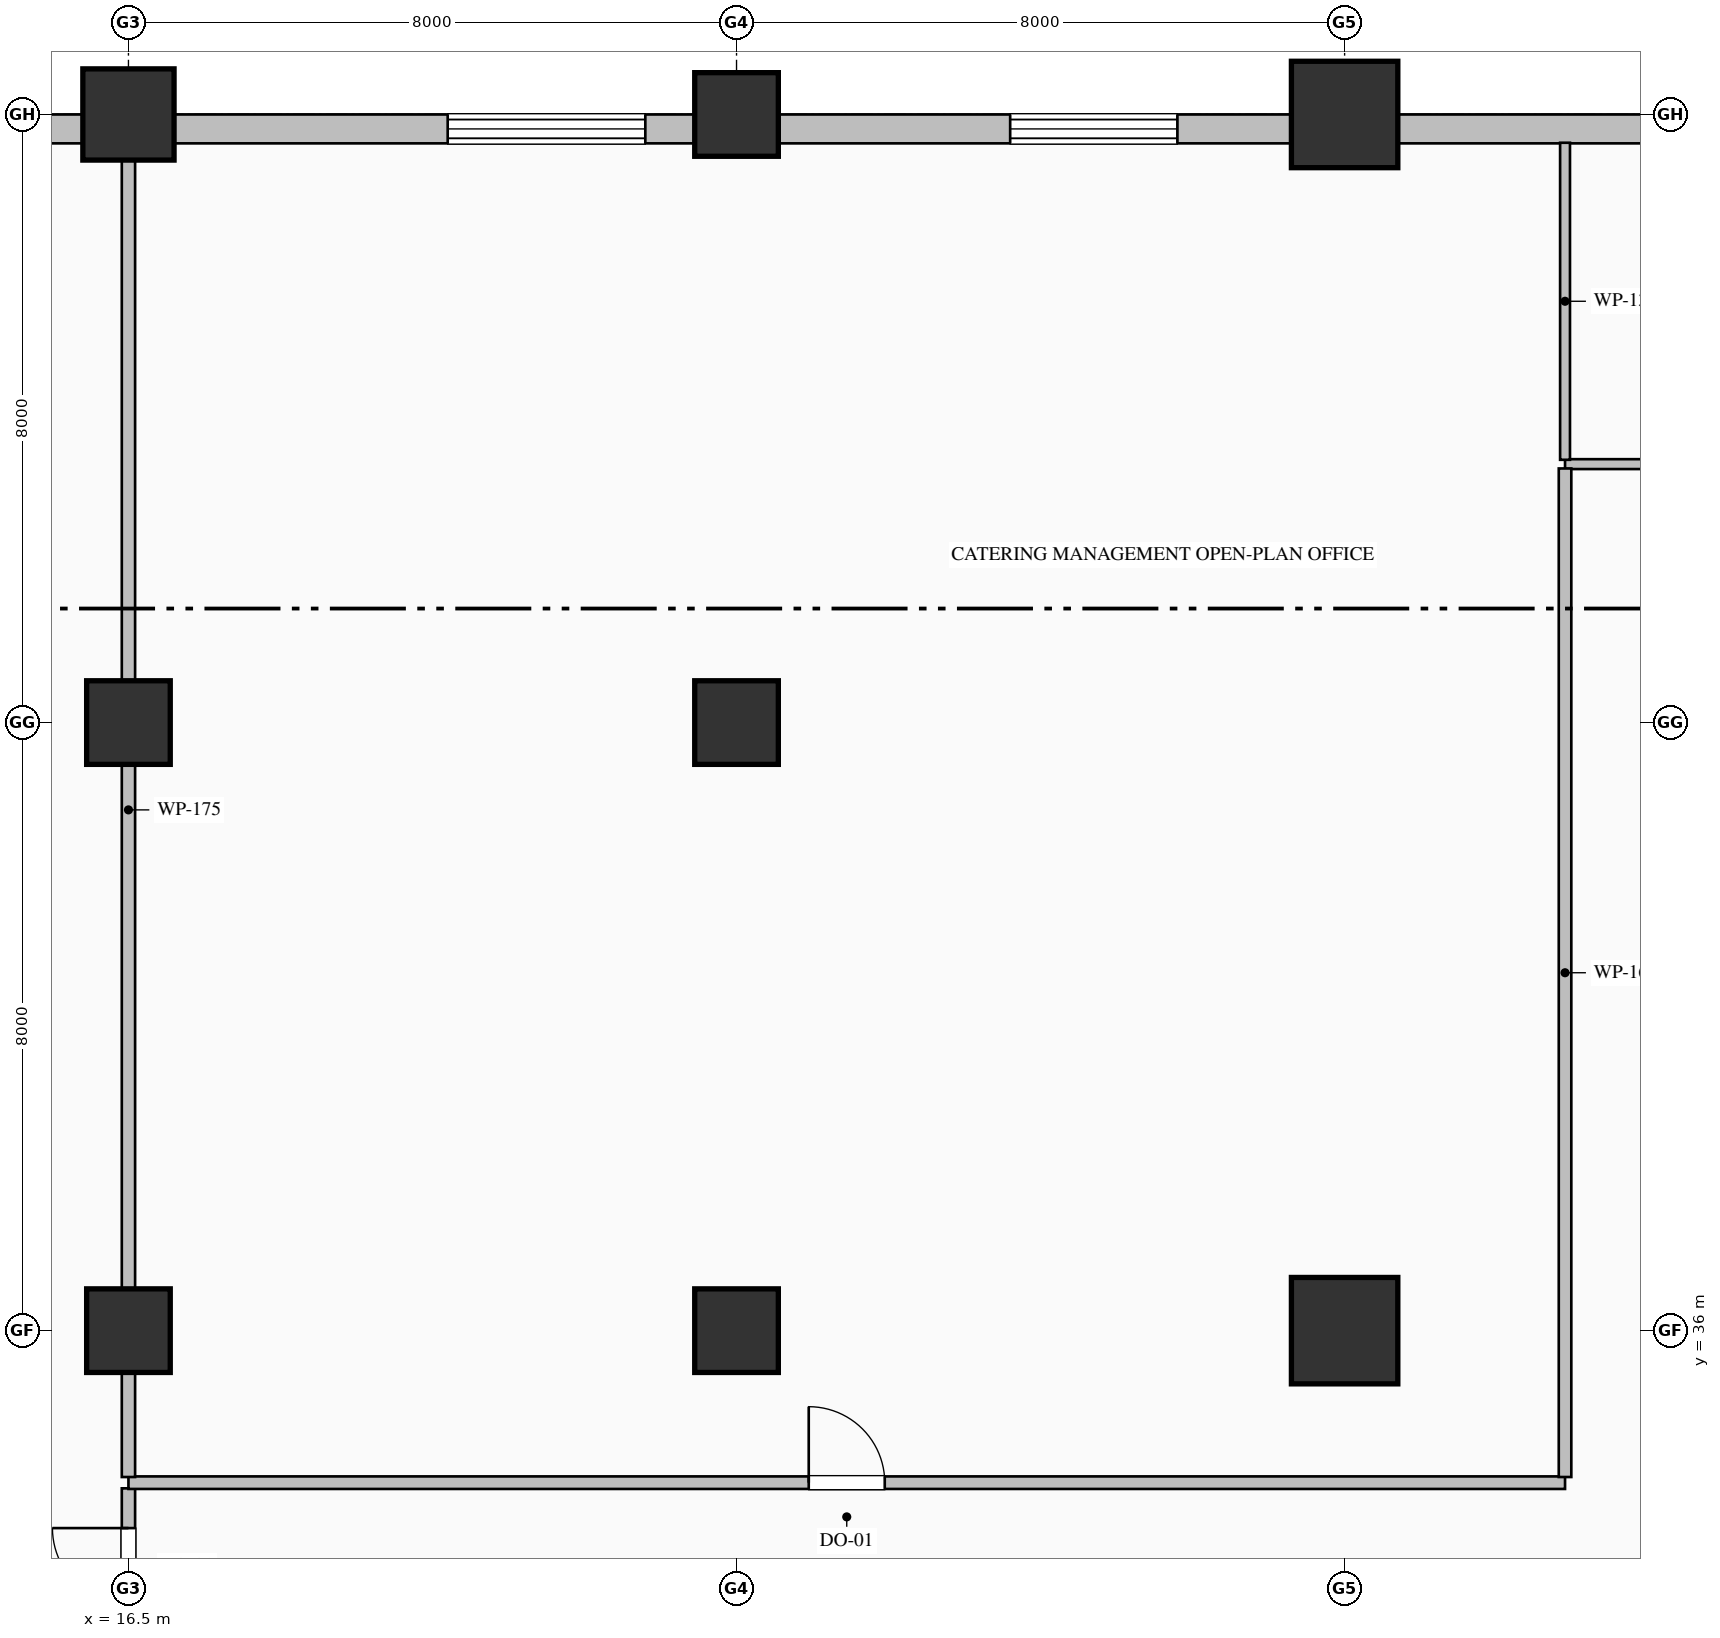
"""IFC4 building model, lengths in metres.
Left out: names, types, materials, properties, quantities, classifications, styles, units other than length and angle.
Written with IfcOpenShell. Run it as: python <this file> out.ifc"""

import sys

from ifc_helpers import new_model, si_unit, direction, frame, frame_2d, origin, origin_2d, place, context, subcontext, project, spatial, rectangle, hollow_rectangle, hollow_circle, extrude, element, fill, save


model = new_model("IFC4")
c1 = context("Model", 3, precision=1e-05, world=origin(), true_north=direction((0.0, 1.0)))
c2 = subcontext(c1, "Body", "Model", "MODEL_VIEW")
j1 = project(units=[si_unit("LENGTHUNIT", "METRE"), si_unit("PLANEANGLEUNIT", "RADIAN")], contexts=[c1])
p1 = place(None, origin())
s1 = spatial("IfcSite", under=j1, at=p1, CompositionType="ELEMENT")
p2 = place(p1, origin())
s2 = spatial("IfcBuilding", under=s1, at=p2, CompositionType="ELEMENT")
p3 = place(p2, frame((0.0, 0.0, 22.8)))
s3 = spatial("IfcBuildingStorey", under=s2, at=p3, CompositionType="ELEMENT", Elevation=22.8)
for number, where, z_axis, x_axis in (
    (1, (16.5, 36.0, 0.0), (0.0, 0.0, 1.0), (1.0, 0.0, 0.0)),
    (2, (16.5, 44.0, 0.0), (0.0, 0.0, 1.0), (1.0, 0.0, 0.0)),
):
    element("IfcColumn", number, at=place(p3, frame(where, z_axis=z_axis, x_axis=x_axis)), inside=s3, PredefinedType="COLUMN", context=c2, shape_type="SweptSolid", body=[
        extrude(rectangle(XDim=1.1, YDim=1.1, at=origin_2d()), origin(), (0.0, 0.0, 1.0), 5.4),
    ])
p4 = place(p3, frame((16.5, 52.0, 0.0), z_axis=(0.0, 0.0, 1.0), x_axis=(1.0, 0.0, 0.0)))
e3 = element("IfcColumn", 3, at=p4, inside=s3, PredefinedType="COLUMN", context=c2, shape_type="SweptSolid", body=[
    extrude(hollow_circle(Radius=0.6, WallThickness=0.04, at=origin_2d()), origin(), (0.0, 0.0, 1.0), 5.4),
])
for number, where, z_axis, x_axis in (
    (4, (24.5, 36.0, 0.0), (0.0, 0.0, 1.0), (1.0, 0.0, 0.0)),
    (5, (24.5, 44.0, 0.0), (0.0, 0.0, 1.0), (1.0, 0.0, 0.0)),
):
    element("IfcColumn", number, at=place(p3, frame(where, z_axis=z_axis, x_axis=x_axis)), inside=s3, PredefinedType="COLUMN", context=c2, shape_type="SweptSolid", body=[
        extrude(rectangle(XDim=1.1, YDim=1.1, at=origin_2d()), origin(), (0.0, 0.0, 1.0), 5.4),
    ])
p5 = place(p3, frame((24.5, 52.0, 0.0), z_axis=(0.0, 0.0, 1.0), x_axis=(1.0, 0.0, 0.0)))
e6 = element("IfcColumn", 6, at=p5, inside=s3, PredefinedType="COLUMN", context=c2, shape_type="SweptSolid", body=[
    extrude(hollow_rectangle(XDim=1.1, YDim=1.1, WallThickness=0.04, at=origin_2d()), origin(), (0.0, 0.0, 1.0), 5.4),
])
for number, where, z_axis, x_axis in (
    (7, (32.5, 36.0, 0.0), (0.0, 0.0, 1.0), (1.0, 0.0, 0.0)),
    (8, (32.5, 52.0, 0.0), (0.0, 0.0, 1.0), (1.0, 0.0, 0.0)),
):
    element("IfcColumn", number, at=place(p3, frame(where, z_axis=z_axis, x_axis=x_axis)), inside=s3, PredefinedType="COLUMN", context=c2, shape_type="SweptSolid", body=[
        extrude(hollow_rectangle(XDim=1.4, YDim=1.4, WallThickness=0.05, at=origin_2d()), origin(), (0.0, 0.0, 1.0), 5.4),
    ])
p6 = place(p3, frame((4.0, 51.81, 0.0), z_axis=(0.0, 0.0, 1.0), x_axis=(1.0, 0.0, 0.0)))
e9 = element("IfcWall", 9, at=p6, inside=s3, PredefinedType="SOLIDWALL", context=c2, shape_type="SweptSolid", body=[
    extrude(rectangle(XDim=36.52, YDim=0.38, at=frame_2d((18.26, 0.0))), origin(), (0.0, 0.0, 1.0), 4.65),
])
p7 = place(p6, frame((16.7, 0.0, 0.85)))
e10 = element("IfcOpeningElement", 10, at=p7, cuts=e9, PredefinedType="OPENING", context=c2, shape_type="SweptSolid", body=[
    extrude(rectangle(XDim=2.6, YDim=3.1, at=frame_2d((1.3, 1.55))), frame((0.0, 0.2, 0.0), z_axis=(0.0, -1.0, 0.0), x_axis=(1.0, 0.0, 0.0)), (0.0, 0.0, 1.0), 0.4),
])
p8 = place(p6, frame((24.1, 0.0, 0.9)))
e11 = element("IfcOpeningElement", 11, at=p8, cuts=e9, PredefinedType="OPENING", context=c2, shape_type="SweptSolid", body=[
    extrude(rectangle(XDim=2.2, YDim=2.65, at=frame_2d((1.1, 1.325))), frame((0.0, 0.2, 0.0), z_axis=(0.0, -1.0, 0.0), x_axis=(1.0, 0.0, 0.0)), (0.0, 0.0, 1.0), 0.4),
])
p9 = place(p3, frame((37.8, 47.4, 0.0), z_axis=(0.0, 0.0, 1.0), x_axis=(-1.0, 0.0, 0.0)))
e12 = element("IfcWall", 12, at=p9, inside=s3, PredefinedType="PARTITIONING", context=c2, shape_type="SweptSolid", body=[
    extrude(rectangle(XDim=2.4, YDim=0.13, at=frame_2d((1.2, 0.0))), origin(), (0.0, 0.0, 1.0), 5.15),
])
p10 = place(p3, frame((35.4, 47.457, 0.0), z_axis=(0.0, 0.0, 1.0), x_axis=(0.0, 1.0, 0.0)))
e13 = element("IfcWall", 13, at=p10, inside=s3, PredefinedType="PARTITIONING", context=c2, shape_type="SweptSolid", body=[
    extrude(rectangle(XDim=4.171, YDim=0.13, at=frame_2d((2.085, 0.0))), origin(), (0.0, 0.0, 1.0), 5.15),
])
p11 = place(p3, frame((16.5, 31.879, 0.0), z_axis=(0.0, 0.0, 1.0), x_axis=(0.0, 1.0, 0.0)))
e14 = element("IfcWall", 14, at=p11, inside=s3, PredefinedType="PARTITIONING", context=c2, shape_type="SweptSolid", body=[
    extrude(rectangle(XDim=2.046, YDim=0.175, at=frame_2d((1.023, 0.0))), origin(), (0.0, 0.0, 1.0), 4.442),
])
p12 = place(p11, frame((0.523, 0.0, 0.0)))
e15 = element("IfcOpeningElement", 15, at=p12, cuts=e14, PredefinedType="OPENING", context=c2, shape_type="SweptSolid", body=[
    extrude(rectangle(XDim=1.0, YDim=2.15, at=frame_2d((0.5, 1.075))), frame((0.0, 0.098, 0.0), z_axis=(0.0, -1.0, 0.0), x_axis=(1.0, 0.0, 0.0)), (0.0, 0.0, 1.0), 0.195),
])
p13 = place(p3, frame((16.5, 34.0, 0.0), z_axis=(0.0, 0.0, 1.0), x_axis=(1.0, 0.0, 0.0)))
e16 = element("IfcWall", 16, at=p13, inside=s3, PredefinedType="PARTITIONING", context=c2, shape_type="SweptSolid", body=[
    extrude(rectangle(XDim=18.9, YDim=0.165, at=frame_2d((9.45, 0.0))), origin(), (0.0, 0.0, 1.0), 5.15),
])
p14 = place(p13, frame((8.95, 0.0, 0.0)))
e17 = element("IfcOpeningElement", 17, at=p14, cuts=e16, PredefinedType="OPENING", context=c2, shape_type="SweptSolid", body=[
    extrude(rectangle(XDim=1.0, YDim=2.15, at=frame_2d((0.5, 1.075))), frame((0.0, 0.093, 0.0), z_axis=(0.0, -1.0, 0.0), x_axis=(1.0, 0.0, 0.0)), (0.0, 0.0, 1.0), 0.185),
])
p15 = place(p3, frame((35.4, 34.074, 0.0), z_axis=(0.0, 0.0, 1.0), x_axis=(0.0, 1.0, 0.0)))
e18 = element("IfcWall", 18, at=p15, inside=s3, PredefinedType="PARTITIONING", context=c2, shape_type="SweptSolid", body=[
    extrude(rectangle(XDim=13.269, YDim=0.165, at=frame_2d((6.634, 0.0))), origin(), (0.0, 0.0, 1.0), 5.15),
])
p16 = place(p3, frame((16.5, 51.628, 0.0), z_axis=(0.0, 0.0, 1.0), x_axis=(0.0, -1.0, 0.0)))
e19 = element("IfcWall", 19, at=p16, inside=s3, PredefinedType="PARTITIONING", context=c2, shape_type="SweptSolid", body=[
    extrude(rectangle(XDim=17.553, YDim=0.175, at=frame_2d((8.777, 0.0))), origin(), (0.0, 0.0, 1.0), 4.442),
])
p17 = place(p7, origin())
e20 = element("IfcWindow", 20, at=p17, inside=s3, PartitioningType="TRIPLE_PANEL_VERTICAL", PredefinedType="WINDOW", context=c2, shape_type="SweptSolid", body=[
    extrude(rectangle(XDim=2.6, YDim=3.1, at=frame_2d((1.3, 1.55))), frame((0.0, 0.15, 0.0), z_axis=(0.0, -1.0, 0.0), x_axis=(1.0, 0.0, 0.0)), (0.0, 0.0, 1.0), 0.06),
])
fill(e10, e20)
p18 = place(p8, origin())
e21 = element("IfcWindow", 21, at=p18, inside=s3, PartitioningType="TRIPLE_PANEL_VERTICAL", PredefinedType="WINDOW", context=c2, shape_type="SweptSolid", body=[
    extrude(rectangle(XDim=2.2, YDim=2.65, at=frame_2d((1.1, 1.325))), frame((0.0, 0.15, 0.0), z_axis=(0.0, -1.0, 0.0), x_axis=(1.0, 0.0, 0.0)), (0.0, 0.0, 1.0), 0.06),
])
fill(e11, e21)
p19 = place(p12, origin())
e22 = element("IfcDoor", 22, at=p19, inside=s3, OperationType="SINGLE_SWING_RIGHT", PredefinedType="DOOR", context=c2, shape_type="SweptSolid", body=[
    extrude(rectangle(XDim=1.0, YDim=2.15, at=frame_2d((0.5, 1.075))), frame((0.0, 0.025, 0.0), z_axis=(0.0, -1.0, 0.0), x_axis=(1.0, 0.0, 0.0)), (0.0, 0.0, 1.0), 0.05),
])
fill(e15, e22)
p20 = place(p14, origin())
e23 = element("IfcDoor", 23, at=p20, inside=s3, OperationType="SINGLE_SWING_LEFT", PredefinedType="DOOR", context=c2, shape_type="SweptSolid", body=[
    extrude(rectangle(XDim=1.0, YDim=2.15, at=frame_2d((0.5, 1.075))), frame((0.0, 0.025, 0.0), z_axis=(0.0, -1.0, 0.0), x_axis=(1.0, 0.0, 0.0)), (0.0, 0.0, 1.0), 0.05),
])
fill(e17, e23)
save(model, sys.argv[1])
